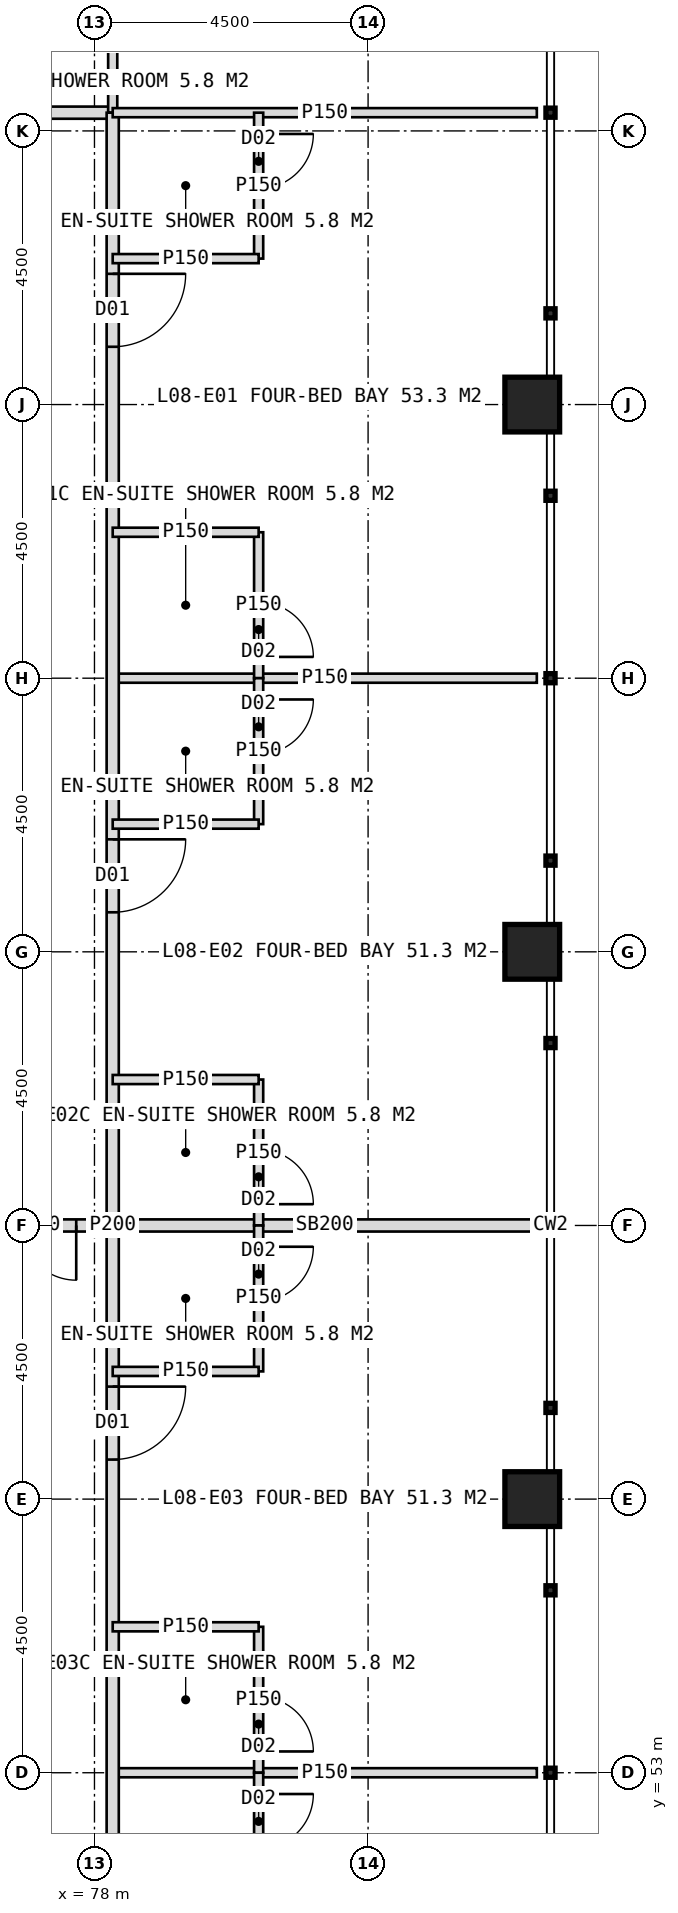
"""IFC4 building model, lengths in metres.
Left out: names, types, materials, properties, quantities, classifications, styles, units other than length and angle.
Written with IfcOpenShell. Run it as: python <this file> out.ifc"""

import sys

from ifc_helpers import new_model, si_unit, direction, frame, frame_2d, origin, origin_2d, place, context, subcontext, project, spatial, rectangle, hollow_rectangle, extrude, element, fill, save


model = new_model("IFC4")
c1 = context("Model", 3, precision=1e-05, world=origin(), true_north=direction((0.0, 1.0)))
c2 = subcontext(c1, "Body", "Model", "MODEL_VIEW")
j1 = project(units=[si_unit("LENGTHUNIT", "METRE"), si_unit("PLANEANGLEUNIT", "RADIAN")], contexts=[c1])
p1 = place(None, origin())
s1 = spatial("IfcSite", under=j1, at=p1, CompositionType="ELEMENT")
p2 = place(p1, origin())
s2 = spatial("IfcBuilding", under=s1, at=p2, CompositionType="ELEMENT")
p3 = place(p2, frame((0.0, 0.0, 39.0)))
s3 = spatial("IfcBuildingStorey", under=s2, at=p3, CompositionType="ELEMENT", Elevation=39.0)
for number, where, z_axis, x_axis in (
    (1, (85.2, 57.5, 0.0), (0.0, 0.0, 1.0), (1.0, 0.0, 0.0)),
    (2, (85.2, 66.5, 0.0), (0.0, 0.0, 1.0), (1.0, 0.0, 0.0)),
    (3, (85.2, 75.5, 0.0), (0.0, 0.0, 1.0), (1.0, 0.0, 0.0)),
):
    element("IfcColumn", number, at=place(p3, frame(where, z_axis=z_axis, x_axis=x_axis)), inside=s3, PredefinedType="COLUMN", context=c2, shape_type="SweptSolid", body=[
        extrude(hollow_rectangle(XDim=0.9, YDim=0.9, WallThickness=0.08, at=origin_2d()), origin(), (0.0, 0.0, 1.0), 4.0),
    ])
p4 = place(p3, frame((41.7, 80.3, 0.0), z_axis=(0.0, 0.0, 1.0), x_axis=(1.0, 0.0, 0.0)))
e4 = element("IfcWall", 4, at=p4, inside=s3, PredefinedType="PARTITIONING", context=c2, shape_type="SweptSolid", body=[
    extrude(rectangle(XDim=36.6, YDim=0.2, at=frame_2d((18.3, 0.0))), origin(), (0.0, 0.0, 1.0), 3.75),
])
p5 = place(p4, frame((2.65, 0.0, 0.0)))
e5 = element("IfcOpeningElement", 5, at=p5, cuts=e4, PredefinedType="OPENING", context=c2, shape_type="SweptSolid", body=[
    extrude(rectangle(XDim=1.2, YDim=2.2, at=frame_2d((0.6, 1.1))), frame((0.0, 0.11, 0.0), z_axis=(0.0, -1.0, 0.0), x_axis=(1.0, 0.0, 0.0)), (0.0, 0.0, 1.0), 0.22),
])
p6 = place(p4, frame((11.95, 0.0, 0.0)))
e6 = element("IfcOpeningElement", 6, at=p6, cuts=e4, PredefinedType="OPENING", context=c2, shape_type="SweptSolid", body=[
    extrude(rectangle(XDim=1.2, YDim=2.2, at=frame_2d((0.6, 1.1))), frame((0.0, 0.11, 0.0), z_axis=(0.0, -1.0, 0.0), x_axis=(1.0, 0.0, 0.0)), (0.0, 0.0, 1.0), 0.22),
])
p7 = place(p4, frame((20.8, 0.0, 0.0)))
e7 = element("IfcOpeningElement", 7, at=p7, cuts=e4, PredefinedType="OPENING", context=c2, shape_type="SweptSolid", body=[
    extrude(rectangle(XDim=1.0, YDim=2.1, at=frame_2d((0.5, 1.05))), frame((0.0, 0.11, 0.0), z_axis=(0.0, -1.0, 0.0), x_axis=(1.0, 0.0, 0.0)), (0.0, 0.0, 1.0), 0.22),
])
p8 = place(p4, frame((26.95, 0.0, 0.0)))
e8 = element("IfcOpeningElement", 8, at=p8, cuts=e4, PredefinedType="OPENING", context=c2, shape_type="SweptSolid", body=[
    extrude(rectangle(XDim=1.2, YDim=2.2, at=frame_2d((0.6, 1.1))), frame((0.0, 0.11, 0.0), z_axis=(0.0, -1.0, 0.0), x_axis=(1.0, 0.0, 0.0)), (0.0, 0.0, 1.0), 0.22),
])
p9 = place(p3, frame((78.3, 80.3, 0.0), z_axis=(0.0, 0.0, 1.0), x_axis=(0.0, 1.0, 0.0)))
e9 = element("IfcWall", 9, at=p9, inside=s3, PredefinedType="PARTITIONING", context=c2, shape_type="SweptSolid", body=[
    extrude(rectangle(XDim=2.4, YDim=0.15, at=frame_2d((1.2, 0.0))), origin(), (0.0, 0.0, 1.0), 3.75),
])
p10 = place(p3, frame((78.3, 71.0, 0.0), z_axis=(0.0, 0.0, 1.0), x_axis=(1.0, 0.0, 0.0)))
e10 = element("IfcWall", 10, at=p10, inside=s3, PredefinedType="PARTITIONING", context=c2, shape_type="SweptSolid", body=[
    extrude(rectangle(XDim=6.975, YDim=0.15, at=frame_2d((3.487, 0.0))), origin(), (0.0, 0.0, 1.0), 3.75),
])
p11 = place(p3, frame((78.3, 62.0, 0.0), z_axis=(0.0, 0.0, 1.0), x_axis=(1.0, 0.0, 0.0)))
e11 = element("IfcWall", 11, at=p11, inside=s3, PredefinedType="SOLIDWALL", context=c2, shape_type="SweptSolid", body=[
    extrude(rectangle(XDim=6.975, YDim=0.2, at=frame_2d((3.487, 0.0))), origin(), (0.0, 0.0, 1.0), 2.75),
])
p12 = place(p3, frame((78.3, 53.0, 0.0), z_axis=(0.0, 0.0, 1.0), x_axis=(1.0, 0.0, 0.0)))
e12 = element("IfcWall", 12, at=p12, inside=s3, PredefinedType="PARTITIONING", context=c2, shape_type="SweptSolid", body=[
    extrude(rectangle(XDim=6.975, YDim=0.15, at=frame_2d((3.487, 0.0))), origin(), (0.0, 0.0, 1.0), 3.75),
])
p13 = place(p3, frame((78.3, 80.3, 0.0), z_axis=(0.0, 0.0, 1.0), x_axis=(0.0, -1.0, 0.0)))
e13 = element("IfcWall", 13, at=p13, inside=s3, PredefinedType="PARTITIONING", context=c2, shape_type="SweptSolid", body=[
    extrude(rectangle(XDim=36.6, YDim=0.2, at=frame_2d((18.3, 0.0))), origin(), (0.0, 0.0, 1.0), 3.75),
])
p14 = place(p13, frame((2.65, 0.0, 0.0)))
e14 = element("IfcOpeningElement", 14, at=p14, cuts=e13, PredefinedType="OPENING", context=c2, shape_type="SweptSolid", body=[
    extrude(rectangle(XDim=1.2, YDim=2.2, at=frame_2d((0.6, 1.1))), frame((0.0, 0.11, 0.0), z_axis=(0.0, -1.0, 0.0), x_axis=(1.0, 0.0, 0.0)), (0.0, 0.0, 1.0), 0.22),
])
p15 = place(p13, frame((11.95, 0.0, 0.0)))
e15 = element("IfcOpeningElement", 15, at=p15, cuts=e13, PredefinedType="OPENING", context=c2, shape_type="SweptSolid", body=[
    extrude(rectangle(XDim=1.2, YDim=2.2, at=frame_2d((0.6, 1.1))), frame((0.0, 0.11, 0.0), z_axis=(0.0, -1.0, 0.0), x_axis=(1.0, 0.0, 0.0)), (0.0, 0.0, 1.0), 0.22),
])
p16 = place(p13, frame((20.95, 0.0, 0.0)))
e16 = element("IfcOpeningElement", 16, at=p16, cuts=e13, PredefinedType="OPENING", context=c2, shape_type="SweptSolid", body=[
    extrude(rectangle(XDim=1.2, YDim=2.2, at=frame_2d((0.6, 1.1))), frame((0.0, 0.11, 0.0), z_axis=(0.0, -1.0, 0.0), x_axis=(1.0, 0.0, 0.0)), (0.0, 0.0, 1.0), 0.22),
])
p17 = place(p13, frame((29.95, 0.0, 0.0)))
e17 = element("IfcOpeningElement", 17, at=p17, cuts=e13, PredefinedType="OPENING", context=c2, shape_type="SweptSolid", body=[
    extrude(rectangle(XDim=1.2, YDim=2.2, at=frame_2d((0.6, 1.1))), frame((0.0, 0.11, 0.0), z_axis=(0.0, -1.0, 0.0), x_axis=(1.0, 0.0, 0.0)), (0.0, 0.0, 1.0), 0.22),
])
p18 = place(p3, frame((78.3, 80.3, 0.0), z_axis=(0.0, 0.0, 1.0), x_axis=(1.0, 0.0, 0.0)))
e18 = element("IfcWall", 18, at=p18, inside=s3, PredefinedType="PARTITIONING", context=c2, shape_type="SweptSolid", body=[
    extrude(rectangle(XDim=6.975, YDim=0.15, at=frame_2d((3.487, 0.0))), origin(), (0.0, 0.0, 1.0), 3.75),
])
p19 = place(p3, frame((80.7, 80.3, 0.0), z_axis=(0.0, 0.0, 1.0), x_axis=(0.0, -1.0, 0.0)))
e19 = element("IfcWall", 19, at=p19, inside=s3, PredefinedType="PARTITIONING", context=c2, shape_type="SweptSolid", body=[
    extrude(rectangle(XDim=2.4, YDim=0.15, at=frame_2d((1.2, 0.0))), origin(), (0.0, 0.0, 1.0), 2.95),
])
p20 = place(p19, frame((0.35, 0.0, 0.0)))
e20 = element("IfcOpeningElement", 20, at=p20, cuts=e19, PredefinedType="OPENING", context=c2, shape_type="SweptSolid", body=[
    extrude(rectangle(XDim=0.9, YDim=2.1, at=frame_2d((0.45, 1.05))), frame((0.0, 0.085, 0.0), z_axis=(0.0, -1.0, 0.0), x_axis=(1.0, 0.0, 0.0)), (0.0, 0.0, 1.0), 0.17),
])
p21 = place(p3, frame((78.3, 77.9, 0.0), z_axis=(0.0, 0.0, 1.0), x_axis=(1.0, 0.0, 0.0)))
e21 = element("IfcWall", 21, at=p21, inside=s3, PredefinedType="PARTITIONING", context=c2, shape_type="SweptSolid", body=[
    extrude(rectangle(XDim=2.4, YDim=0.15, at=frame_2d((1.2, 0.0))), origin(), (0.0, 0.0, 1.0), 3.75),
])
p22 = place(p3, frame((80.7, 73.4, 0.0), z_axis=(0.0, 0.0, 1.0), x_axis=(0.0, -1.0, 0.0)))
e22 = element("IfcWall", 22, at=p22, inside=s3, PredefinedType="PARTITIONING", context=c2, shape_type="SweptSolid", body=[
    extrude(rectangle(XDim=2.4, YDim=0.15, at=frame_2d((1.2, 0.0))), origin(), (0.0, 0.0, 1.0), 3.75),
])
p23 = place(p22, frame((1.15, 0.0, 0.0)))
e23 = element("IfcOpeningElement", 23, at=p23, cuts=e22, PredefinedType="OPENING", context=c2, shape_type="SweptSolid", body=[
    extrude(rectangle(XDim=0.9, YDim=2.1, at=frame_2d((0.45, 1.05))), frame((0.0, 0.085, 0.0), z_axis=(0.0, -1.0, 0.0), x_axis=(1.0, 0.0, 0.0)), (0.0, 0.0, 1.0), 0.17),
])
p24 = place(p3, frame((78.3, 73.4, 0.0), z_axis=(0.0, 0.0, 1.0), x_axis=(1.0, 0.0, 0.0)))
e24 = element("IfcWall", 24, at=p24, inside=s3, PredefinedType="PARTITIONING", context=c2, shape_type="SweptSolid", body=[
    extrude(rectangle(XDim=2.4, YDim=0.15, at=frame_2d((1.2, 0.0))), origin(), (0.0, 0.0, 1.0), 3.75),
])
p25 = place(p3, frame((80.7, 71.0, 0.0), z_axis=(0.0, 0.0, 1.0), x_axis=(0.0, -1.0, 0.0)))
e25 = element("IfcWall", 25, at=p25, inside=s3, PredefinedType="PARTITIONING", context=c2, shape_type="SweptSolid", body=[
    extrude(rectangle(XDim=2.4, YDim=0.15, at=frame_2d((1.2, 0.0))), origin(), (0.0, 0.0, 1.0), 3.75),
])
p26 = place(p25, frame((0.35, 0.0, 0.0)))
e26 = element("IfcOpeningElement", 26, at=p26, cuts=e25, PredefinedType="OPENING", context=c2, shape_type="SweptSolid", body=[
    extrude(rectangle(XDim=0.9, YDim=2.1, at=frame_2d((0.45, 1.05))), frame((0.0, 0.085, 0.0), z_axis=(0.0, -1.0, 0.0), x_axis=(1.0, 0.0, 0.0)), (0.0, 0.0, 1.0), 0.17),
])
p27 = place(p3, frame((78.3, 68.6, 0.0), z_axis=(0.0, 0.0, 1.0), x_axis=(1.0, 0.0, 0.0)))
e27 = element("IfcWall", 27, at=p27, inside=s3, PredefinedType="PARTITIONING", context=c2, shape_type="SweptSolid", body=[
    extrude(rectangle(XDim=2.4, YDim=0.15, at=frame_2d((1.2, 0.0))), origin(), (0.0, 0.0, 1.0), 3.75),
])
p28 = place(p3, frame((80.7, 64.4, 0.0), z_axis=(0.0, 0.0, 1.0), x_axis=(0.0, -1.0, 0.0)))
e28 = element("IfcWall", 28, at=p28, inside=s3, PredefinedType="PARTITIONING", context=c2, shape_type="SweptSolid", body=[
    extrude(rectangle(XDim=2.4, YDim=0.15, at=frame_2d((1.2, 0.0))), origin(), (0.0, 0.0, 1.0), 3.75),
])
p29 = place(p28, frame((1.15, 0.0, 0.0)))
e29 = element("IfcOpeningElement", 29, at=p29, cuts=e28, PredefinedType="OPENING", context=c2, shape_type="SweptSolid", body=[
    extrude(rectangle(XDim=0.9, YDim=2.1, at=frame_2d((0.45, 1.05))), frame((0.0, 0.085, 0.0), z_axis=(0.0, -1.0, 0.0), x_axis=(1.0, 0.0, 0.0)), (0.0, 0.0, 1.0), 0.17),
])
p30 = place(p3, frame((78.3, 64.4, 0.0), z_axis=(0.0, 0.0, 1.0), x_axis=(1.0, 0.0, 0.0)))
e30 = element("IfcWall", 30, at=p30, inside=s3, PredefinedType="PARTITIONING", context=c2, shape_type="SweptSolid", body=[
    extrude(rectangle(XDim=2.4, YDim=0.15, at=frame_2d((1.2, 0.0))), origin(), (0.0, 0.0, 1.0), 3.75),
])
p31 = place(p3, frame((80.7, 62.0, 0.0), z_axis=(0.0, 0.0, 1.0), x_axis=(0.0, -1.0, 0.0)))
e31 = element("IfcWall", 31, at=p31, inside=s3, PredefinedType="PARTITIONING", context=c2, shape_type="SweptSolid", body=[
    extrude(rectangle(XDim=2.4, YDim=0.15, at=frame_2d((1.2, 0.0))), origin(), (0.0, 0.0, 1.0), 3.75),
])
p32 = place(p31, frame((0.35, 0.0, 0.0)))
e32 = element("IfcOpeningElement", 32, at=p32, cuts=e31, PredefinedType="OPENING", context=c2, shape_type="SweptSolid", body=[
    extrude(rectangle(XDim=0.9, YDim=2.1, at=frame_2d((0.45, 1.05))), frame((0.0, 0.085, 0.0), z_axis=(0.0, -1.0, 0.0), x_axis=(1.0, 0.0, 0.0)), (0.0, 0.0, 1.0), 0.17),
])
p33 = place(p3, frame((78.3, 59.6, 0.0), z_axis=(0.0, 0.0, 1.0), x_axis=(1.0, 0.0, 0.0)))
e33 = element("IfcWall", 33, at=p33, inside=s3, PredefinedType="PARTITIONING", context=c2, shape_type="SweptSolid", body=[
    extrude(rectangle(XDim=2.4, YDim=0.15, at=frame_2d((1.2, 0.0))), origin(), (0.0, 0.0, 1.0), 3.75),
])
p34 = place(p3, frame((80.7, 55.4, 0.0), z_axis=(0.0, 0.0, 1.0), x_axis=(0.0, -1.0, 0.0)))
e34 = element("IfcWall", 34, at=p34, inside=s3, PredefinedType="PARTITIONING", context=c2, shape_type="SweptSolid", body=[
    extrude(rectangle(XDim=2.4, YDim=0.15, at=frame_2d((1.2, 0.0))), origin(), (0.0, 0.0, 1.0), 3.75),
])
p35 = place(p34, frame((1.15, 0.0, 0.0)))
e35 = element("IfcOpeningElement", 35, at=p35, cuts=e34, PredefinedType="OPENING", context=c2, shape_type="SweptSolid", body=[
    extrude(rectangle(XDim=0.9, YDim=2.1, at=frame_2d((0.45, 1.05))), frame((0.0, 0.085, 0.0), z_axis=(0.0, -1.0, 0.0), x_axis=(1.0, 0.0, 0.0)), (0.0, 0.0, 1.0), 0.17),
])
p36 = place(p3, frame((78.3, 55.4, 0.0), z_axis=(0.0, 0.0, 1.0), x_axis=(1.0, 0.0, 0.0)))
e36 = element("IfcWall", 36, at=p36, inside=s3, PredefinedType="PARTITIONING", context=c2, shape_type="SweptSolid", body=[
    extrude(rectangle(XDim=2.4, YDim=0.15, at=frame_2d((1.2, 0.0))), origin(), (0.0, 0.0, 1.0), 3.75),
])
p37 = place(p3, frame((80.7, 53.0, 0.0), z_axis=(0.0, 0.0, 1.0), x_axis=(0.0, -1.0, 0.0)))
e37 = element("IfcWall", 37, at=p37, inside=s3, PredefinedType="PARTITIONING", context=c2, shape_type="SweptSolid", body=[
    extrude(rectangle(XDim=2.4, YDim=0.15, at=frame_2d((1.2, 0.0))), origin(), (0.0, 0.0, 1.0), 3.75),
])
p38 = place(p37, frame((0.35, 0.0, 0.0)))
e38 = element("IfcOpeningElement", 38, at=p38, cuts=e37, PredefinedType="OPENING", context=c2, shape_type="SweptSolid", body=[
    extrude(rectangle(XDim=0.9, YDim=2.1, at=frame_2d((0.45, 1.05))), frame((0.0, 0.085, 0.0), z_axis=(0.0, -1.0, 0.0), x_axis=(1.0, 0.0, 0.0)), (0.0, 0.0, 1.0), 0.17),
])
p39 = place(p3, frame((75.6, 62.0, 0.0), z_axis=(0.0, 0.0, 1.0), x_axis=(1.0, 0.0, 0.0)))
e39 = element("IfcWall", 39, at=p39, inside=s3, PredefinedType="SOLIDWALL", context=c2, shape_type="SweptSolid", body=[
    extrude(rectangle(XDim=2.7, YDim=0.2, at=frame_2d((1.35, 0.0))), origin(), (0.0, 0.0, 1.0), 2.75),
])
p40 = place(p39, frame((0.3, 0.0, 0.0)))
e40 = element("IfcOpeningElement", 40, at=p40, cuts=e39, PredefinedType="OPENING", context=c2, shape_type="SweptSolid", body=[
    extrude(rectangle(XDim=1.8, YDim=2.2, at=frame_2d((0.9, 1.1))), frame((0.0, 0.11, 0.0), z_axis=(0.0, -1.0, 0.0), x_axis=(1.0, 0.0, 0.0)), (0.0, 0.0, 1.0), 0.22),
])
p41 = place(p14, origin())
e41 = element("IfcDoor", 41, at=p41, inside=s3, OperationType="SINGLE_SWING_LEFT", PredefinedType="DOOR", context=c2, shape_type="SweptSolid", body=[
    extrude(rectangle(XDim=1.2, YDim=2.2, at=frame_2d((0.6, 1.1))), frame((0.0, 0.025, 0.0), z_axis=(0.0, -1.0, 0.0), x_axis=(1.0, 0.0, 0.0)), (0.0, 0.0, 1.0), 0.05),
])
fill(e14, e41)
p42 = place(p20, origin())
e42 = element("IfcDoor", 42, at=p42, inside=s3, OperationType="SINGLE_SWING_LEFT", PredefinedType="DOOR", context=c2, shape_type="SweptSolid", body=[
    extrude(rectangle(XDim=0.9, YDim=2.1, at=frame_2d((0.45, 1.05))), frame((0.0, 0.025, 0.0), z_axis=(0.0, -1.0, 0.0), x_axis=(1.0, 0.0, 0.0)), (0.0, 0.0, 1.0), 0.05),
])
fill(e20, e42)
p43 = place(p23, origin())
e43 = element("IfcDoor", 43, at=p43, inside=s3, OperationType="SINGLE_SWING_RIGHT", PredefinedType="DOOR", context=c2, shape_type="SweptSolid", body=[
    extrude(rectangle(XDim=0.9, YDim=2.1, at=frame_2d((0.45, 1.05))), frame((0.0, 0.025, 0.0), z_axis=(0.0, -1.0, 0.0), x_axis=(1.0, 0.0, 0.0)), (0.0, 0.0, 1.0), 0.05),
])
fill(e23, e43)
p44 = place(p15, origin())
e44 = element("IfcDoor", 44, at=p44, inside=s3, OperationType="SINGLE_SWING_LEFT", PredefinedType="DOOR", context=c2, shape_type="SweptSolid", body=[
    extrude(rectangle(XDim=1.2, YDim=2.2, at=frame_2d((0.6, 1.1))), frame((0.0, 0.025, 0.0), z_axis=(0.0, -1.0, 0.0), x_axis=(1.0, 0.0, 0.0)), (0.0, 0.0, 1.0), 0.05),
])
fill(e15, e44)
p45 = place(p26, origin())
e45 = element("IfcDoor", 45, at=p45, inside=s3, OperationType="SINGLE_SWING_LEFT", PredefinedType="DOOR", context=c2, shape_type="SweptSolid", body=[
    extrude(rectangle(XDim=0.9, YDim=2.1, at=frame_2d((0.45, 1.05))), frame((0.0, 0.025, 0.0), z_axis=(0.0, -1.0, 0.0), x_axis=(1.0, 0.0, 0.0)), (0.0, 0.0, 1.0), 0.05),
])
fill(e26, e45)
p46 = place(p29, origin())
e46 = element("IfcDoor", 46, at=p46, inside=s3, OperationType="SINGLE_SWING_RIGHT", PredefinedType="DOOR", context=c2, shape_type="SweptSolid", body=[
    extrude(rectangle(XDim=0.9, YDim=2.1, at=frame_2d((0.45, 1.05))), frame((0.0, 0.025, 0.0), z_axis=(0.0, -1.0, 0.0), x_axis=(1.0, 0.0, 0.0)), (0.0, 0.0, 1.0), 0.05),
])
fill(e29, e46)
p47 = place(p16, origin())
e47 = element("IfcDoor", 47, at=p47, inside=s3, OperationType="SINGLE_SWING_LEFT", PredefinedType="DOOR", context=c2, shape_type="SweptSolid", body=[
    extrude(rectangle(XDim=1.2, YDim=2.2, at=frame_2d((0.6, 1.1))), frame((0.0, 0.025, 0.0), z_axis=(0.0, -1.0, 0.0), x_axis=(1.0, 0.0, 0.0)), (0.0, 0.0, 1.0), 0.05),
])
fill(e16, e47)
p48 = place(p32, origin())
e48 = element("IfcDoor", 48, at=p48, inside=s3, OperationType="SINGLE_SWING_LEFT", PredefinedType="DOOR", context=c2, shape_type="SweptSolid", body=[
    extrude(rectangle(XDim=0.9, YDim=2.1, at=frame_2d((0.45, 1.05))), frame((0.0, 0.025, 0.0), z_axis=(0.0, -1.0, 0.0), x_axis=(1.0, 0.0, 0.0)), (0.0, 0.0, 1.0), 0.05),
])
fill(e32, e48)
p49 = place(p35, origin())
e49 = element("IfcDoor", 49, at=p49, inside=s3, OperationType="SINGLE_SWING_RIGHT", PredefinedType="DOOR", context=c2, shape_type="SweptSolid", body=[
    extrude(rectangle(XDim=0.9, YDim=2.1, at=frame_2d((0.45, 1.05))), frame((0.0, 0.025, 0.0), z_axis=(0.0, -1.0, 0.0), x_axis=(1.0, 0.0, 0.0)), (0.0, 0.0, 1.0), 0.05),
])
fill(e35, e49)
p50 = place(p38, origin())
e50 = element("IfcDoor", 50, at=p50, inside=s3, OperationType="SINGLE_SWING_LEFT", PredefinedType="DOOR", context=c2, shape_type="SweptSolid", body=[
    extrude(rectangle(XDim=0.9, YDim=2.1, at=frame_2d((0.45, 1.05))), frame((0.0, 0.025, 0.0), z_axis=(0.0, -1.0, 0.0), x_axis=(1.0, 0.0, 0.0)), (0.0, 0.0, 1.0), 0.05),
])
fill(e38, e50)
p51 = place(p40, origin())
e51 = element("IfcDoor", 51, at=p51, inside=s3, OperationType="DOUBLE_DOOR_DOUBLE_SWING", PredefinedType="DOOR", context=c2, shape_type="SweptSolid", body=[
    extrude(rectangle(XDim=1.8, YDim=2.2, at=frame_2d((0.9, 1.1))), frame((0.0, 0.025, 0.0), z_axis=(0.0, -1.0, 0.0), x_axis=(1.0, 0.0, 0.0)), (0.0, 0.0, 1.0), 0.05),
])
fill(e40, e51)
save(model, sys.argv[1])
